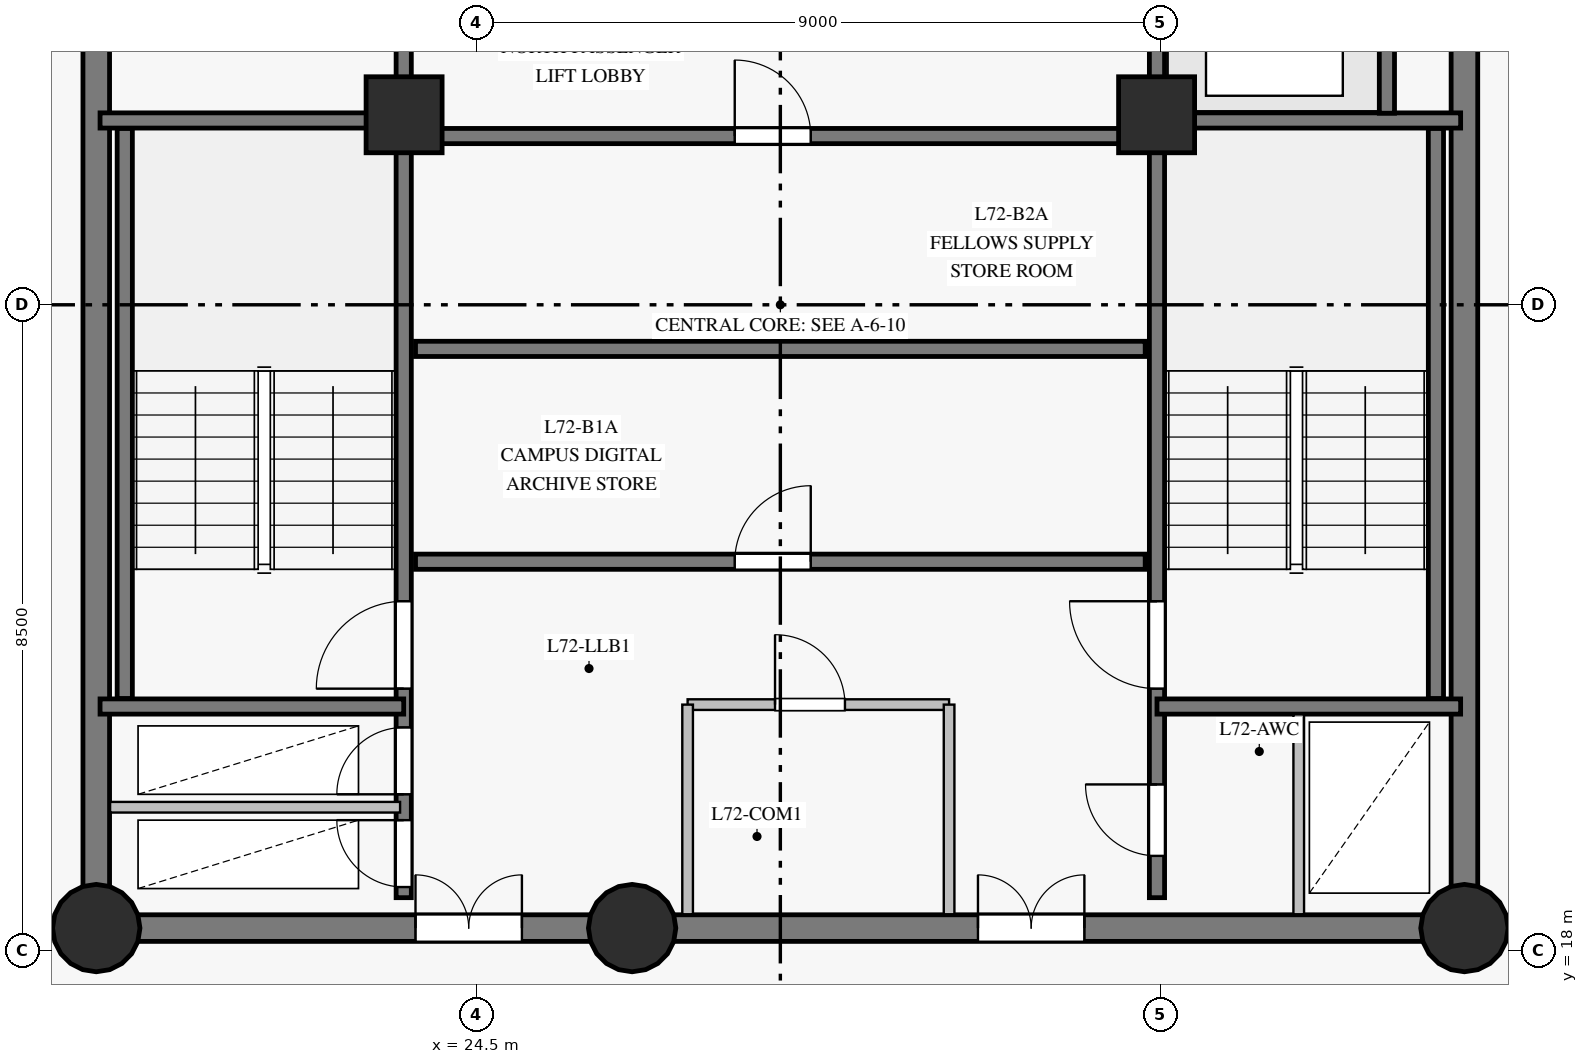
"""IFC4 building model, lengths in metres.
Left out: names, types, materials, properties, quantities, classifications, styles, units other than length and angle.
Written with IfcOpenShell. Run it as: python <this file> out.ifc"""

import sys

from ifc_helpers import new_model, si_unit, direction, frame, frame_2d, origin, origin_with_axes, origin_2d, place, context, subcontext, project, spatial, rectangle, circle, extrude, source, transform, mapped, element, fill, save


model = new_model("IFC4")
c1 = context("Model", 3, precision=1e-05, world=origin(), true_north=direction((0.0, 1.0)))
c2 = subcontext(c1, "Body", "Model", "MODEL_VIEW")
j1 = project(units=[si_unit("LENGTHUNIT", "METRE"), si_unit("PLANEANGLEUNIT", "RADIAN")], contexts=[c1])
p1 = place(None, origin())
s1 = spatial("IfcSite", under=j1, at=p1, CompositionType="ELEMENT")
p2 = place(p1, origin())
s2 = spatial("IfcBuilding", under=s1, at=p2, CompositionType="ELEMENT")
p3 = place(p2, frame((0.0, 0.0, 244.35)))
s3 = spatial("IfcBuildingStorey", under=s2, at=p3, CompositionType="ELEMENT", Elevation=244.35)
p4 = place(p3, frame((19.5, 18.3, 0.0), z_axis=(0.0, 0.0, 1.0), x_axis=(1.0, 0.0, 0.0)))
e1 = element("IfcWall", 1, at=p4, inside=s3, PredefinedType="SHEAR", context=c2, shape_type="SweptSolid", body=[
    extrude(rectangle(XDim=7.05, YDim=0.35, at=frame_2d((3.525, 0.0))), origin(), (0.0, 0.0, 1.0), 2.85),
])
p5 = place(p4, frame((4.2, 0.0, 0.0)))
e2 = element("IfcOpeningElement", 2, at=p5, cuts=e1, PredefinedType="OPENING", context=c2, shape_type="SweptSolid", body=[
    extrude(rectangle(XDim=1.4, YDim=2.2, at=frame_2d((0.7, 1.1))), frame((0.0, 0.185, 0.0), z_axis=(0.0, -1.0, 0.0), x_axis=(1.0, 0.0, 0.0)), (0.0, 0.0, 1.0), 0.37),
])
p6 = place(p3, frame((26.55, 18.3, 0.0), z_axis=(0.0, 0.0, 1.0), x_axis=(1.0, 0.0, 0.0)))
e3 = element("IfcWall", 3, at=p6, inside=s3, PredefinedType="SHEAR", context=c2, shape_type="SweptSolid", body=[
    extrude(rectangle(XDim=10.95, YDim=0.35, at=frame_2d((5.475, 0.0))), origin(), (0.0, 0.0, 1.0), 2.85),
])
p7 = place(p6, frame((4.55, 0.0, 0.0)))
e4 = element("IfcOpeningElement", 4, at=p7, cuts=e3, PredefinedType="OPENING", context=c2, shape_type="SweptSolid", body=[
    extrude(rectangle(XDim=1.4, YDim=2.2, at=frame_2d((0.7, 1.1))), frame((0.0, 0.185, 0.0), z_axis=(0.0, -1.0, 0.0), x_axis=(1.0, 0.0, 0.0)), (0.0, 0.0, 1.0), 0.37),
])
p8 = place(p3, frame((37.5, 18.3, 0.0), z_axis=(0.0, 0.0, 1.0), x_axis=(0.0, 1.0, 0.0)))
e5 = element("IfcWall", 5, at=p8, inside=s3, PredefinedType="SHEAR", context=c2, shape_type="SweptSolid", body=[
    extrude(rectangle(XDim=16.4, YDim=0.35, at=frame_2d((8.2, 0.0))), origin(), (0.0, 0.0, 1.0), 2.85),
])
p9 = place(p8, frame((13.85, 0.0, 0.0)))
e6 = element("IfcOpeningElement", 6, at=p9, cuts=e5, PredefinedType="OPENING", context=c2, shape_type="SweptSolid", body=[
    extrude(rectangle(XDim=1.2, YDim=2.15, at=frame_2d((0.6, 1.075))), frame((0.0, 0.185, 0.0), z_axis=(0.0, -1.0, 0.0), x_axis=(1.0, 0.0, 0.0)), (0.0, 0.0, 1.0), 0.37),
])
p10 = place(p3, frame((19.5, 34.7, 0.0), z_axis=(0.0, 0.0, 1.0), x_axis=(0.0, -1.0, 0.0)))
e7 = element("IfcWall", 7, at=p10, inside=s3, PredefinedType="SHEAR", context=c2, shape_type="SweptSolid", body=[
    extrude(rectangle(XDim=16.4, YDim=0.35, at=frame_2d((8.2, 0.0))), origin(), (0.0, 0.0, 1.0), 2.85),
])
p11 = place(p10, frame((3.24, 0.0, 0.0)))
e8 = element("IfcOpeningElement", 8, at=p11, cuts=e7, PredefinedType="OPENING", context=c2, shape_type="SweptSolid", body=[
    extrude(rectangle(XDim=1.1, YDim=2.15, at=frame_2d((0.55, 1.075))), frame((0.0, 0.185, 0.0), z_axis=(0.0, -1.0, 0.0), x_axis=(1.0, 0.0, 0.0)), (0.0, 0.0, 1.0), 0.37),
])
m1 = source(origin_with_axes(), c2, "Body", "SweptSolid", [
    extrude(circle(Radius=0.575, at=origin_2d()), origin(), (0.0, 0.0, 1.0), 3.05),
])
for number, where, z_axis, x_axis in (
    (9, (19.5, 18.3, 0.0), (0.0, 0.0, 1.0), (1.0, 0.0, 0.0)),
    (10, (26.55, 18.3, 0.0), (0.0, 0.0, 1.0), (1.0, 0.0, 0.0)),
    (11, (37.5, 18.3, 0.0), (0.0, 0.0, 1.0), (1.0, 0.0, 0.0)),
):
    element("IfcColumn", number, at=place(p3, frame(where, z_axis=z_axis, x_axis=x_axis)), inside=s3, PredefinedType="COLUMN", context=c2, shape_type="MappedRepresentation", body=[
        mapped(m1, transform((0.0, 0.0, 0.0), scale=1.0)),
    ])
m2 = source(origin_with_axes(), c2, "Body", "SweptSolid", [
    extrude(rectangle(XDim=1.0, YDim=1.0, at=origin_2d()), origin(), (0.0, 0.0, 1.0), 3.05),
])
for number, where, z_axis, x_axis in (
    (12, (23.55, 29.0, 0.0), (0.0, 0.0, 1.0), (1.0, 0.0, 0.0)),
    (13, (33.45, 29.0, 0.0), (0.0, 0.0, 1.0), (1.0, 0.0, 0.0)),
):
    element("IfcColumn", number, at=place(p3, frame(where, z_axis=z_axis, x_axis=x_axis)), inside=s3, PredefinedType="COLUMN", context=c2, shape_type="MappedRepresentation", body=[
        mapped(m2, transform((0.0, 0.0, 0.0), scale=1.0)),
    ])
p12 = place(p3, frame((23.545, 18.7, 0.0), z_axis=(0.0, 0.0, 1.0), x_axis=(0.0, 1.0, 0.0)))
e14 = element("IfcWall", 14, at=p12, inside=s3, PredefinedType="SHEAR", context=c2, shape_type="SweptSolid", body=[
    extrude(rectangle(XDim=15.6, YDim=0.2, at=frame_2d((7.8, 0.0))), origin(), (0.0, 0.0, 1.0), 2.85),
])
p13 = place(p12, frame((2.75, 0.0, 0.0)))
e15 = element("IfcOpeningElement", 15, at=p13, cuts=e14, PredefinedType="OPENING", context=c2, shape_type="SweptSolid", body=[
    extrude(rectangle(XDim=1.15, YDim=2.15, at=frame_2d((0.575, 1.075))), frame((0.0, 0.11, 0.0), z_axis=(0.0, -1.0, 0.0), x_axis=(1.0, 0.0, 0.0)), (0.0, 0.0, 1.0), 0.22),
])
p14 = place(p12, frame((0.14, 0.0, 0.0)))
e16 = element("IfcOpeningElement", 16, at=p14, cuts=e14, PredefinedType="OPENING", context=c2, shape_type="SweptSolid", body=[
    extrude(rectangle(XDim=0.88, YDim=2.1, at=frame_2d((0.44, 1.05))), frame((0.0, 0.11, 0.0), z_axis=(0.0, -1.0, 0.0), x_axis=(1.0, 0.0, 0.0)), (0.0, 0.0, 1.0), 0.22),
])
p15 = place(p12, frame((1.36, 0.0, 0.0)))
e17 = element("IfcOpeningElement", 17, at=p15, cuts=e14, PredefinedType="OPENING", context=c2, shape_type="SweptSolid", body=[
    extrude(rectangle(XDim=0.88, YDim=2.1, at=frame_2d((0.44, 1.05))), frame((0.0, 0.11, 0.0), z_axis=(0.0, -1.0, 0.0), x_axis=(1.0, 0.0, 0.0)), (0.0, 0.0, 1.0), 0.22),
])
p16 = place(p12, frame((12.1, 0.0, 0.0)))
e18 = element("IfcOpeningElement", 18, at=p16, cuts=e14, PredefinedType="OPENING", context=c2, shape_type="SweptSolid", body=[
    extrude(rectangle(XDim=1.12, YDim=2.15, at=frame_2d((0.56, 1.075))), frame((0.0, 0.11, 0.0), z_axis=(0.0, -1.0, 0.0), x_axis=(1.0, 0.0, 0.0)), (0.0, 0.0, 1.0), 0.22),
])
p17 = place(p12, frame((14.05, 0.0, 0.0)))
e19 = element("IfcOpeningElement", 19, at=p17, cuts=e14, PredefinedType="OPENING", context=c2, shape_type="SweptSolid", body=[
    extrude(rectangle(XDim=1.12, YDim=2.15, at=frame_2d((0.56, 1.075))), frame((0.0, 0.11, 0.0), z_axis=(0.0, -1.0, 0.0), x_axis=(1.0, 0.0, 0.0)), (0.0, 0.0, 1.0), 0.22),
])
p18 = place(p3, frame((33.455, 18.7, 0.0), z_axis=(0.0, 0.0, 1.0), x_axis=(0.0, 1.0, 0.0)))
e20 = element("IfcWall", 20, at=p18, inside=s3, PredefinedType="SHEAR", context=c2, shape_type="SweptSolid", body=[
    extrude(rectangle(XDim=15.6, YDim=0.2, at=frame_2d((7.8, 0.0))), origin(), (0.0, 0.0, 1.0), 2.85),
])
p19 = place(p18, frame((2.75, 0.0, 0.0)))
e21 = element("IfcOpeningElement", 21, at=p19, cuts=e20, PredefinedType="OPENING", context=c2, shape_type="SweptSolid", body=[
    extrude(rectangle(XDim=1.15, YDim=2.15, at=frame_2d((0.575, 1.075))), frame((0.0, 0.11, 0.0), z_axis=(0.0, -1.0, 0.0), x_axis=(1.0, 0.0, 0.0)), (0.0, 0.0, 1.0), 0.22),
])
p20 = place(p18, frame((0.55, 0.0, 0.0)))
e22 = element("IfcOpeningElement", 22, at=p20, cuts=e20, PredefinedType="OPENING", context=c2, shape_type="SweptSolid", body=[
    extrude(rectangle(XDim=0.94, YDim=2.1, at=frame_2d((0.47, 1.05))), frame((0.0, 0.11, 0.0), z_axis=(0.0, -1.0, 0.0), x_axis=(1.0, 0.0, 0.0)), (0.0, 0.0, 1.0), 0.22),
])
p21 = place(p3, frame((23.7, 23.12, 0.0), z_axis=(0.0, 0.0, 1.0), x_axis=(1.0, 0.0, 0.0)))
e23 = element("IfcWall", 23, at=p21, inside=s3, PredefinedType="SHEAR", context=c2, shape_type="SweptSolid", body=[
    extrude(rectangle(XDim=9.6, YDim=0.2, at=frame_2d((4.8, 0.0))), origin(), (0.0, 0.0, 1.0), 2.85),
])
p22 = place(p21, frame((4.2, 0.0, 0.0)))
e24 = element("IfcOpeningElement", 24, at=p22, cuts=e23, PredefinedType="OPENING", context=c2, shape_type="SweptSolid", body=[
    extrude(rectangle(XDim=1.0, YDim=2.15, at=frame_2d((0.5, 1.075))), frame((0.0, 0.11, 0.0), z_axis=(0.0, -1.0, 0.0), x_axis=(1.0, 0.0, 0.0)), (0.0, 0.0, 1.0), 0.22),
])
p23 = place(p3, frame((23.7, 25.92, 0.0), z_axis=(0.0, 0.0, 1.0), x_axis=(1.0, 0.0, 0.0)))
e25 = element("IfcWall", 25, at=p23, inside=s3, PredefinedType="SHEAR", context=c2, shape_type="SweptSolid", body=[
    extrude(rectangle(XDim=9.6, YDim=0.2, at=frame_2d((4.8, 0.0))), origin(), (0.0, 0.0, 1.0), 2.85),
])
p24 = place(p3, frame((23.7, 28.72, 0.0), z_axis=(0.0, 0.0, 1.0), x_axis=(1.0, 0.0, 0.0)))
e26 = element("IfcWall", 26, at=p24, inside=s3, PredefinedType="SHEAR", context=c2, shape_type="SweptSolid", body=[
    extrude(rectangle(XDim=9.6, YDim=0.2, at=frame_2d((4.8, 0.0))), origin(), (0.0, 0.0, 1.0), 2.85),
])
p25 = place(p24, frame((4.2, 0.0, 0.0)))
e27 = element("IfcOpeningElement", 27, at=p25, cuts=e26, PredefinedType="OPENING", context=c2, shape_type="SweptSolid", body=[
    extrude(rectangle(XDim=1.0, YDim=2.15, at=frame_2d((0.5, 1.075))), frame((0.0, 0.11, 0.0), z_axis=(0.0, -1.0, 0.0), x_axis=(1.0, 0.0, 0.0)), (0.0, 0.0, 1.0), 0.22),
])
for number, where, z_axis, x_axis in (
    (28, (19.875, 21.32, 0.0), (0.0, 0.0, 1.0), (0.0, 1.0, 0.0)),
    (29, (37.125, 21.32, 0.0), (0.0, 0.0, 1.0), (0.0, 1.0, 0.0)),
):
    element("IfcWall", number, at=place(p3, frame(where, z_axis=z_axis, x_axis=x_axis)), inside=s3, PredefinedType="SHEAR", context=c2, shape_type="SweptSolid", body=[
        extrude(rectangle(XDim=7.5, YDim=0.2, at=frame_2d((3.75, 0.0))), origin(), (0.0, 0.0, 1.0), 2.85),
    ])
for number, where, z_axis, x_axis in (
    (30, (33.455, 21.215, 0.0), (0.0, 0.0, 1.0), (1.0, 0.0, 0.0)),
    (31, (33.455, 28.925, 0.0), (0.0, 0.0, 1.0), (1.0, 0.0, 0.0)),
    (32, (19.55, 21.215, 0.0), (0.0, 0.0, 1.0), (1.0, 0.0, 0.0)),
    (33, (19.55, 28.925, 0.0), (0.0, 0.0, 1.0), (1.0, 0.0, 0.0)),
):
    element("IfcWall", number, at=place(p3, frame(where, z_axis=z_axis, x_axis=x_axis)), inside=s3, PredefinedType="SHEAR", context=c2, shape_type="SweptSolid", body=[
        extrude(rectangle(XDim=3.995, YDim=0.2, at=frame_2d((1.998, 0.0))), origin(), (0.0, 0.0, 1.0), 2.85),
    ])
p26 = place(p3, frame((36.48, 29.02, 0.0), z_axis=(0.0, 0.0, 1.0), x_axis=(0.0, 1.0, 0.0)))
e34 = element("IfcWall", 34, at=p26, inside=s3, PredefinedType="SHEAR", context=c2, shape_type="SweptSolid", body=[
    extrude(rectangle(XDim=2.86, YDim=0.2, at=frame_2d((1.43, 0.0))), origin(), (0.0, 0.0, 1.0), 2.85),
])
p27 = place(p3, frame((19.682, 19.89, 0.0), z_axis=(0.0, 0.0, 1.0), x_axis=(1.0, 0.0, 0.0)))
e35 = element("IfcWall", 35, at=p27, inside=s3, PredefinedType="PARTITIONING", context=c2, shape_type="SweptSolid", body=[
    extrude(rectangle(XDim=3.815, YDim=0.14, at=frame_2d((1.908, 0.0))), origin(), (0.0, 0.0, 1.0), 2.85),
])
p28 = place(p3, frame((27.28, 21.24, 0.0), z_axis=(0.0, 0.0, 1.0), x_axis=(1.0, 0.0, 0.0)))
e36 = element("IfcWall", 36, at=p28, inside=s3, PredefinedType="PARTITIONING", context=c2, shape_type="SweptSolid", body=[
    extrude(rectangle(XDim=3.44, YDim=0.14, at=frame_2d((1.72, 0.0))), origin(), (0.0, 0.0, 1.0), 2.85),
])
p29 = place(p28, frame((1.15, 0.0, 0.0)))
e37 = element("IfcOpeningElement", 37, at=p29, cuts=e36, PredefinedType="OPENING", context=c2, shape_type="SweptSolid", body=[
    extrude(rectangle(XDim=0.92, YDim=2.1, at=frame_2d((0.46, 1.05))), frame((0.0, 0.08, 0.0), z_axis=(0.0, -1.0, 0.0), x_axis=(1.0, 0.0, 0.0)), (0.0, 0.0, 1.0), 0.16),
])
for number, where, z_axis, x_axis in (
    (38, (27.28, 18.482, 0.0), (0.0, 0.0, 1.0), (0.0, 1.0, 0.0)),
    (39, (30.72, 18.482, 0.0), (0.0, 0.0, 1.0), (0.0, 1.0, 0.0)),
):
    element("IfcWall", number, at=place(p3, frame(where, z_axis=z_axis, x_axis=x_axis)), inside=s3, PredefinedType="PARTITIONING", context=c2, shape_type="SweptSolid", body=[
        extrude(rectangle(XDim=2.758, YDim=0.14, at=frame_2d((1.379, 0.0))), origin(), (0.0, 0.0, 1.0), 2.85),
    ])
p30 = place(p3, frame((35.32, 18.482, 0.0), z_axis=(0.0, 0.0, 1.0), x_axis=(0.0, 1.0, 0.0)))
e40 = element("IfcWall", 40, at=p30, inside=s3, PredefinedType="PARTITIONING", context=c2, shape_type="SweptSolid", body=[
    extrude(rectangle(XDim=2.629, YDim=0.14, at=frame_2d((1.314, 0.0))), origin(), (0.0, 0.0, 1.0), 2.85),
])
m3 = source(origin_with_axes(), c2, "Body", "SweptSolid", [
    extrude(rectangle(XDim=1.15, YDim=2.15, at=frame_2d((0.575, 1.075))), frame((0.0, 0.025, 0.0), z_axis=(0.0, -1.0, 0.0), x_axis=(1.0, 0.0, 0.0)), (0.0, 0.0, 1.0), 0.05),
])
p31 = place(p13, origin())
e41 = element("IfcDoor", 41, at=p31, inside=s3, OperationType="SINGLE_SWING_LEFT", PredefinedType="DOOR", context=c2, shape_type="MappedRepresentation", body=[
    mapped(m3, transform((0.0, 0.0, 0.0), scale=1.0)),
])
fill(e15, e41)
p32 = place(p19, origin())
e42 = element("IfcDoor", 42, at=p32, inside=s3, OperationType="SINGLE_SWING_RIGHT", PredefinedType="DOOR", context=c2, shape_type="MappedRepresentation", body=[
    mapped(m3, transform((0.0, 0.0, 0.0), scale=1.0)),
])
fill(e21, e42)
m4 = source(origin_with_axes(), c2, "Body", "SweptSolid", [
    extrude(rectangle(XDim=0.88, YDim=2.1, at=frame_2d((0.44, 1.05))), frame((0.0, 0.025, 0.0), z_axis=(0.0, -1.0, 0.0), x_axis=(1.0, 0.0, 0.0)), (0.0, 0.0, 1.0), 0.05),
])
p33 = place(p14, origin())
e43 = element("IfcDoor", 43, at=p33, inside=s3, OperationType="SINGLE_SWING_RIGHT", PredefinedType="DOOR", context=c2, shape_type="MappedRepresentation", body=[
    mapped(m4, transform((0.0, 0.0, 0.0), scale=1.0)),
])
fill(e16, e43)
p34 = place(p15, origin())
e44 = element("IfcDoor", 44, at=p34, inside=s3, OperationType="SINGLE_SWING_LEFT", PredefinedType="DOOR", context=c2, shape_type="MappedRepresentation", body=[
    mapped(m4, transform((0.0, 0.0, 0.0), scale=1.0)),
])
fill(e17, e44)
m5 = source(origin_with_axes(), c2, "Body", "SweptSolid", [
    extrude(rectangle(XDim=1.4, YDim=2.2, at=frame_2d((0.7, 1.1))), frame((0.0, 0.025, 0.0), z_axis=(0.0, -1.0, 0.0), x_axis=(1.0, 0.0, 0.0)), (0.0, 0.0, 1.0), 0.05),
])
p35 = place(p5, origin())
e45 = element("IfcDoor", 45, at=p35, inside=s3, OperationType="DOUBLE_DOOR_SINGLE_SWING", PredefinedType="DOOR", context=c2, shape_type="MappedRepresentation", body=[
    mapped(m5, transform((0.0, 0.0, 0.0), scale=1.0)),
])
fill(e2, e45)
p36 = place(p7, origin())
e46 = element("IfcDoor", 46, at=p36, inside=s3, OperationType="DOUBLE_DOOR_SINGLE_SWING", PredefinedType="DOOR", context=c2, shape_type="MappedRepresentation", body=[
    mapped(m5, transform((0.0, 0.0, 0.0), scale=1.0)),
])
fill(e4, e46)
m6 = source(origin_with_axes(), c2, "Body", "SweptSolid", [
    extrude(rectangle(XDim=0.94, YDim=2.1, at=frame_2d((0.47, 1.05))), frame((0.0, 0.025, 0.0), z_axis=(0.0, -1.0, 0.0), x_axis=(1.0, 0.0, 0.0)), (0.0, 0.0, 1.0), 0.05),
])
p37 = place(p20, origin())
e47 = element("IfcDoor", 47, at=p37, inside=s3, OperationType="SINGLE_SWING_RIGHT", PredefinedType="DOOR", context=c2, shape_type="MappedRepresentation", body=[
    mapped(m6, transform((0.0, 0.0, 0.0), scale=1.0)),
])
fill(e22, e47)
m7 = source(origin_with_axes(), c2, "Body", "SweptSolid", [
    extrude(rectangle(XDim=0.92, YDim=2.1, at=frame_2d((0.46, 1.05))), frame((0.0, 0.025, 0.0), z_axis=(0.0, -1.0, 0.0), x_axis=(1.0, 0.0, 0.0)), (0.0, 0.0, 1.0), 0.05),
])
p38 = place(p29, origin())
e48 = element("IfcDoor", 48, at=p38, inside=s3, OperationType="SINGLE_SWING_LEFT", PredefinedType="DOOR", context=c2, shape_type="MappedRepresentation", body=[
    mapped(m7, transform((0.0, 0.0, 0.0), scale=1.0)),
])
fill(e37, e48)
m8 = source(origin_with_axes(), c2, "Body", "SweptSolid", [
    extrude(rectangle(XDim=1.0, YDim=2.15, at=frame_2d((0.5, 1.075))), frame((0.0, 0.025, 0.0), z_axis=(0.0, -1.0, 0.0), x_axis=(1.0, 0.0, 0.0)), (0.0, 0.0, 1.0), 0.05),
])
p39 = place(p22, origin())
e49 = element("IfcDoor", 49, at=p39, inside=s3, OperationType="SINGLE_SWING_RIGHT", PredefinedType="DOOR", context=c2, shape_type="MappedRepresentation", body=[
    mapped(m8, transform((0.0, 0.0, 0.0), scale=1.0)),
])
fill(e24, e49)
p40 = place(p25, origin())
e50 = element("IfcDoor", 50, at=p40, inside=s3, OperationType="SINGLE_SWING_LEFT", PredefinedType="DOOR", context=c2, shape_type="MappedRepresentation", body=[
    mapped(m8, transform((0.0, 0.0, 0.0), scale=1.0)),
])
fill(e27, e50)
save(model, sys.argv[1])
